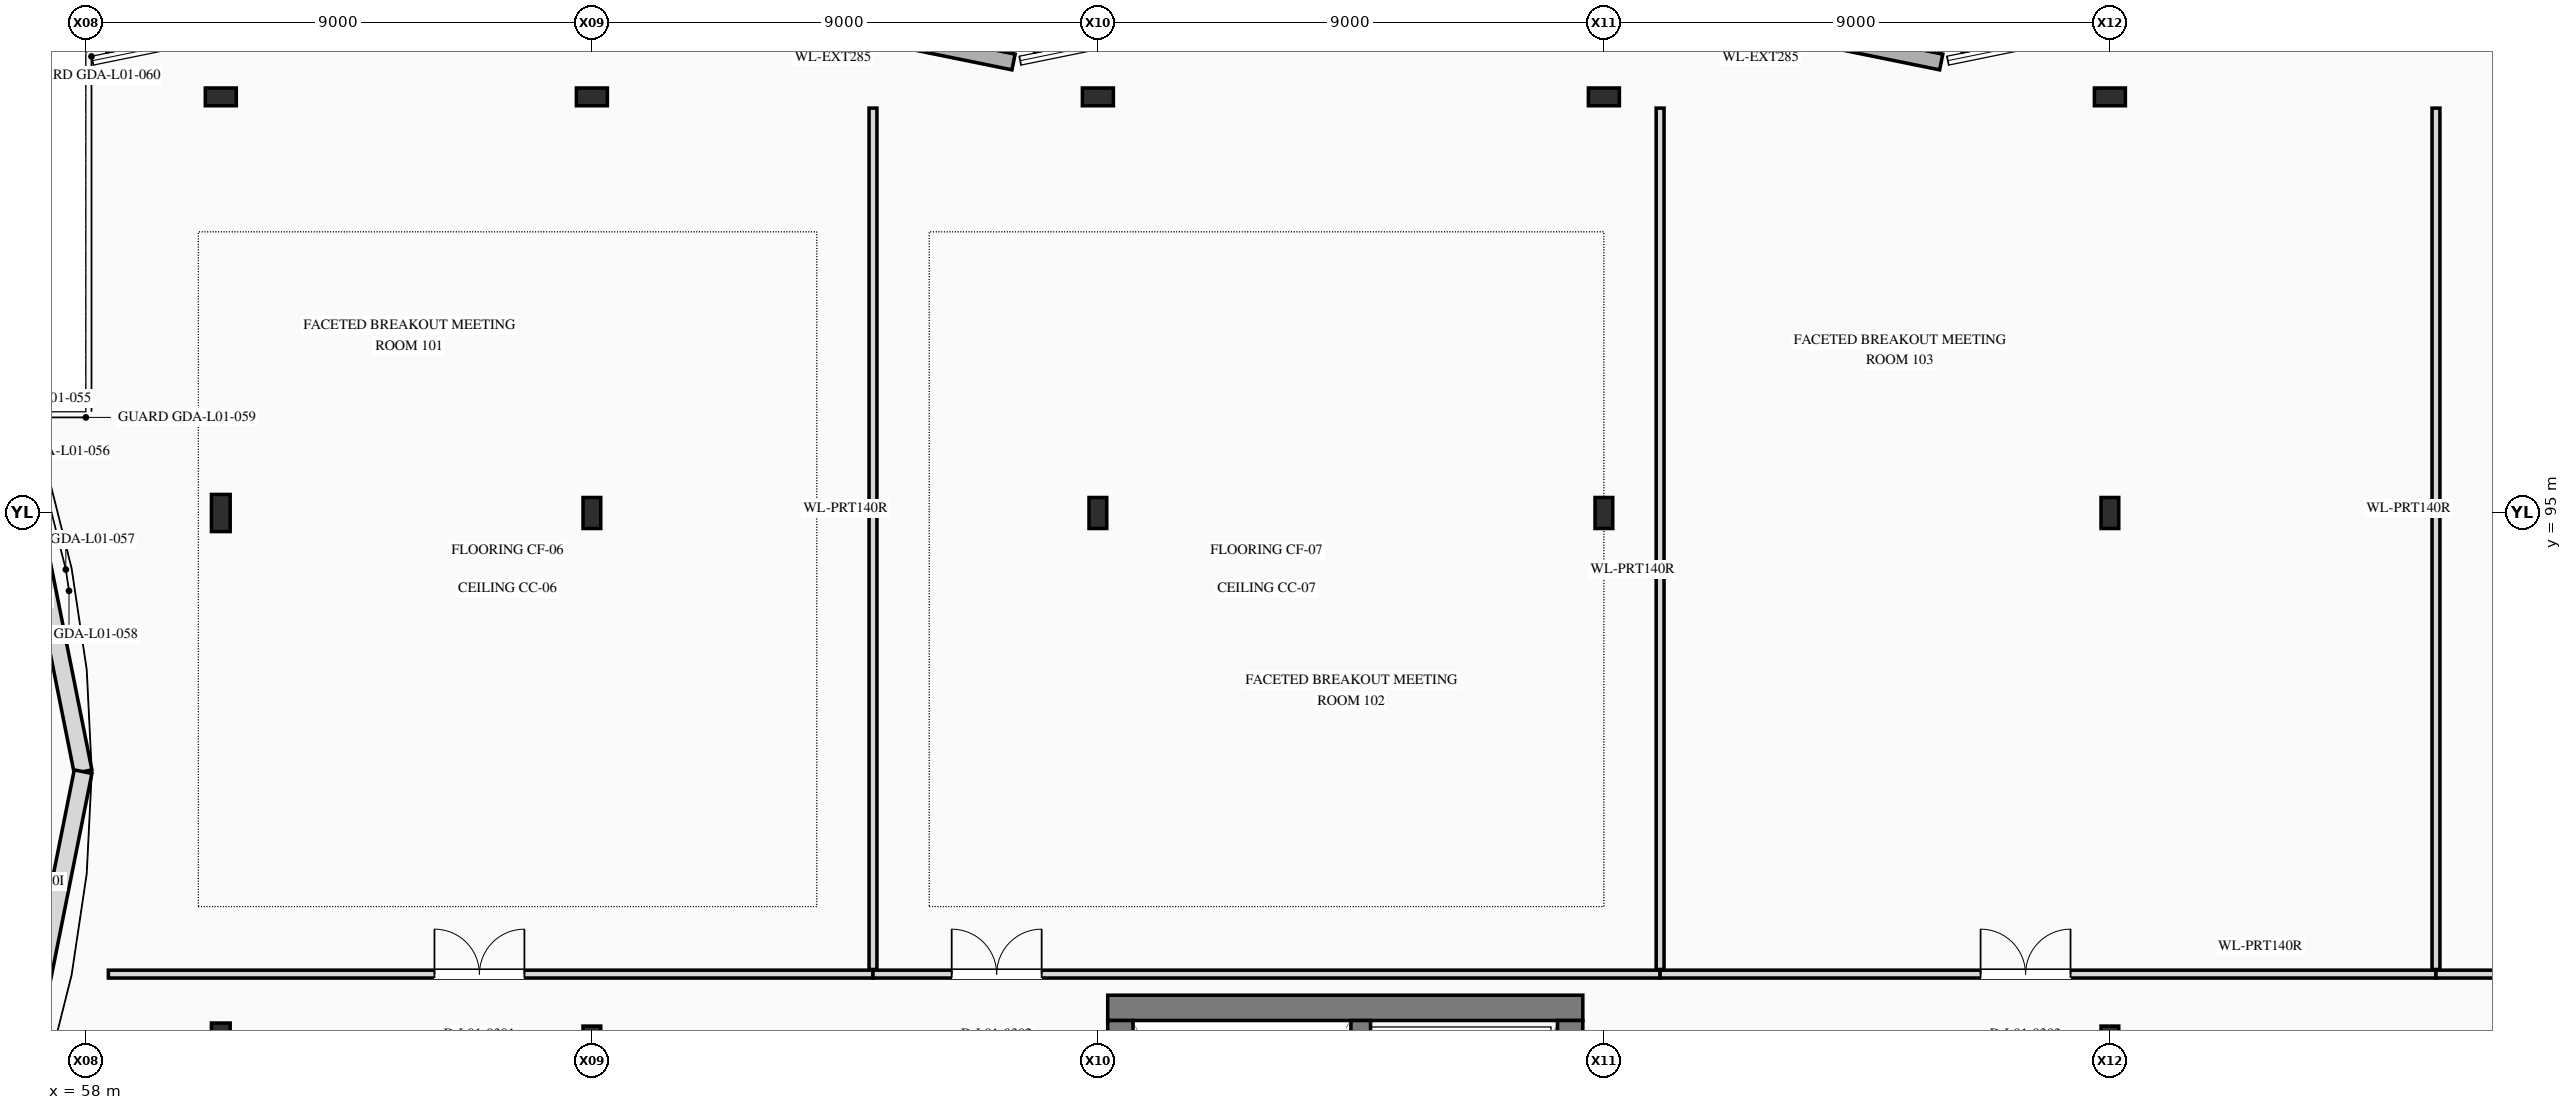
"""IFC4 building model, lengths in metres.
Left out: names, types, materials, properties, quantities, classifications, styles, units other than length and angle.
Written with IfcOpenShell. Run it as: python <this file> out.ifc"""

import sys

from ifc_helpers import new_model, si_unit, direction, frame, frame_2d, origin, origin_2d, place, context, subcontext, project, spatial, rectangle, i_section, extrude, element, fill, save


model = new_model("IFC4")
c1 = context("Model", 3, precision=1e-05, world=origin(), true_north=direction((0.0, 1.0)))
c2 = subcontext(c1, "Body", "Model", "MODEL_VIEW")
j1 = project(units=[si_unit("LENGTHUNIT", "METRE"), si_unit("PLANEANGLEUNIT", "RADIAN")], contexts=[c1])
p1 = place(None, origin())
s1 = spatial("IfcSite", under=j1, at=p1, CompositionType="ELEMENT")
p2 = place(p1, origin())
s2 = spatial("IfcBuilding", under=s1, at=p2, CompositionType="ELEMENT")
p3 = place(p2, frame((0.0, 0.0, 5.4)))
s3 = spatial("IfcBuildingStorey", under=s2, at=p3, CompositionType="ELEMENT", Elevation=5.4)
for number, where, z_axis, x_axis in (
    (1, (67.0, 85.6, 0.0), (0.0, 0.0, 1.0), (1.0, 0.0, 0.0)),
    (2, (67.0, 95.0, 0.0), (0.0, 0.0, 1.0), (1.0, 0.0, 0.0)),
    (3, (76.0, 95.0, 0.0), (0.0, 0.0, 1.0), (1.0, 0.0, 0.0)),
    (4, (85.0, 95.0, 0.0), (0.0, 0.0, 1.0), (1.0, 0.0, 0.0)),
    (5, (94.0, 85.6, 0.0), (0.0, 0.0, 1.0), (1.0, 0.0, 0.0)),
    (6, (94.0, 95.0, 0.0), (0.0, 0.0, 1.0), (1.0, 0.0, 0.0)),
):
    element("IfcColumn", number, at=place(p3, frame(where, z_axis=z_axis, x_axis=x_axis)), inside=s3, PredefinedType="COLUMN", context=c2, shape_type="SweptSolid", body=[
        extrude(i_section(OverallWidth=0.315, OverallDepth=0.551, WebThickness=0.015, FlangeThickness=0.024, at=origin_2d()), origin(), (0.0, 0.0, 1.0), 5.4),
    ])
for number, where, z_axis, x_axis in (
    (7, (60.4, 85.6, 0.0), (0.0, 0.0, 1.0), (1.0, 0.0, 0.0)),
    (8, (60.4, 95.0, 0.0), (0.0, 0.0, 1.0), (1.0, 0.0, 0.0)),
):
    element("IfcColumn", number, at=place(p3, frame(where, z_axis=z_axis, x_axis=x_axis)), inside=s3, PredefinedType="COLUMN", context=c2, shape_type="SweptSolid", body=[
        extrude(i_section(OverallWidth=0.333, OverallDepth=0.66, WebThickness=0.024, FlangeThickness=0.044, at=origin_2d()), origin(), (0.0, 0.0, 1.0), 5.4),
    ])
for number, where, z_axis, x_axis in (
    (9, (60.4, 102.4, 0.0), (0.0, 0.0, 1.0), (0.0, 1.0, 0.0)),
    (10, (67.0, 102.4, 0.0), (0.0, 0.0, 1.0), (0.0, 1.0, 0.0)),
    (11, (76.0, 102.4, 0.0), (0.0, 0.0, 1.0), (0.0, 1.0, 0.0)),
    (12, (85.0, 102.4, 0.0), (0.0, 0.0, 1.0), (0.0, 1.0, 0.0)),
    (13, (94.0, 102.4, 0.0), (0.0, 0.0, 1.0), (0.0, 1.0, 0.0)),
):
    element("IfcColumn", number, at=place(p3, frame(where, z_axis=z_axis, x_axis=x_axis)), inside=s3, PredefinedType="COLUMN", context=c2, shape_type="SweptSolid", body=[
        extrude(i_section(OverallWidth=0.315, OverallDepth=0.551, WebThickness=0.015, FlangeThickness=0.024, at=origin_2d()), origin(), (0.0, 0.0, 1.0), 5.4),
    ])
p4 = place(p3, frame((66.25, 104.698, 0.0), z_axis=(0.0, 0.0, 1.0), x_axis=(0.979925045119, -0.199366260807, 0.0)))
e14 = element("IfcWall", 14, at=p4, inside=s3, PredefinedType="STANDARD", context=c2, shape_type="SweptSolid", body=[
    extrude(rectangle(XDim=8.419, YDim=0.285, at=frame_2d((4.209, 0.0))), origin(), (0.0, 0.0, 1.0), 5.4),
])
p5 = place(p4, frame((0.35, 0.0, 0.9)))
e15 = element("IfcOpeningElement", 15, at=p5, cuts=e14, PredefinedType="OPENING", context=c2, shape_type="SweptSolid", body=[
    extrude(rectangle(XDim=1.5, YDim=1.7, at=frame_2d((0.75, 0.85))), frame((0.0, 0.152, 0.0), z_axis=(0.0, -1.0, 0.0), x_axis=(1.0, 0.0, 0.0)), (0.0, 0.0, 1.0), 0.305),
])
p6 = place(p3, frame((82.75, 104.698, 0.0), z_axis=(0.0, 0.0, 1.0), x_axis=(0.979925045119, -0.199366260807, 0.0)))
e16 = element("IfcWall", 16, at=p6, inside=s3, PredefinedType="STANDARD", context=c2, shape_type="SweptSolid", body=[
    extrude(rectangle(XDim=8.419, YDim=0.285, at=frame_2d((4.209, 0.0))), origin(), (0.0, 0.0, 1.0), 5.4),
])
p7 = place(p6, frame((0.35, 0.0, 0.9)))
e17 = element("IfcOpeningElement", 17, at=p7, cuts=e16, PredefinedType="OPENING", context=c2, shape_type="SweptSolid", body=[
    extrude(rectangle(XDim=1.5, YDim=1.7, at=frame_2d((0.75, 0.85))), frame((0.0, 0.152, 0.0), z_axis=(0.0, -1.0, 0.0), x_axis=(1.0, 0.0, 0.0)), (0.0, 0.0, 1.0), 0.305),
])
p8 = place(p3, frame((99.25, 104.698, 0.0), z_axis=(0.0, 0.0, 1.0), x_axis=(0.979925045119, -0.199366260807, 0.0)))
e18 = element("IfcWall", 18, at=p8, inside=s3, PredefinedType="STANDARD", context=c2, shape_type="SweptSolid", body=[
    extrude(rectangle(XDim=8.419, YDim=0.285, at=frame_2d((4.209, 0.0))), origin(), (0.0, 0.0, 1.0), 5.4),
])
p9 = place(p8, frame((0.35, 0.0, 0.9)))
e19 = element("IfcOpeningElement", 19, at=p9, cuts=e18, PredefinedType="OPENING", context=c2, shape_type="SweptSolid", body=[
    extrude(rectangle(XDim=1.5, YDim=1.7, at=frame_2d((0.75, 0.85))), frame((0.0, 0.152, 0.0), z_axis=(0.0, -1.0, 0.0), x_axis=(1.0, 0.0, 0.0)), (0.0, 0.0, 1.0), 0.305),
])
p10 = place(p3, frame((84.625, 86.2, 0.0), z_axis=(0.0, 0.0, 1.0), x_axis=(-1.0, 0.0, 0.0)))
e20 = element("IfcWall", 20, at=p10, inside=s3, PredefinedType="SHEAR", context=c2, shape_type="SweptSolid", body=[
    extrude(rectangle(XDim=8.45, YDim=0.45, at=frame_2d((4.225, 0.0))), origin(), (0.0, 0.0, 1.0), 5.4),
])
p11 = place(p3, frame((76.4, 85.975, 0.0), z_axis=(0.0, 0.0, 1.0), x_axis=(0.0, -1.0, 0.0)))
e21 = element("IfcWall", 21, at=p11, inside=s3, PredefinedType="SHEAR", context=c2, shape_type="SweptSolid", body=[
    extrude(rectangle(XDim=9.35, YDim=0.45, at=frame_2d((4.675, 0.0))), origin(), (0.0, 0.0, 1.0), 5.4),
])
p12 = place(p3, frame((84.4, 76.625, 0.0), z_axis=(0.0, 0.0, 1.0), x_axis=(0.0, 1.0, 0.0)))
e22 = element("IfcWall", 22, at=p12, inside=s3, PredefinedType="SHEAR", context=c2, shape_type="SweptSolid", body=[
    extrude(rectangle(XDim=9.35, YDim=0.45, at=frame_2d((4.675, 0.0))), origin(), (0.0, 0.0, 1.0), 5.4),
])
p13 = place(p12, frame((2.025, 0.0, 0.0)))
e23 = element("IfcOpeningElement", 23, at=p13, cuts=e22, PredefinedType="OPENING", context=c2, shape_type="SweptSolid", body=[
    extrude(rectangle(XDim=1.1, YDim=2.2, at=frame_2d((0.55, 1.1))), frame((0.0, 0.235, 0.0), z_axis=(0.0, -1.0, 0.0), x_axis=(1.0, 0.0, 0.0)), (0.0, 0.0, 1.0), 0.47),
])
p14 = place(p12, frame((5.625, 0.0, 0.0)))
e24 = element("IfcOpeningElement", 24, at=p14, cuts=e22, PredefinedType="OPENING", context=c2, shape_type="SweptSolid", body=[
    extrude(rectangle(XDim=1.1, YDim=2.2, at=frame_2d((0.55, 1.1))), frame((0.0, 0.235, 0.0), z_axis=(0.0, -1.0, 0.0), x_axis=(1.0, 0.0, 0.0)), (0.0, 0.0, 1.0), 0.47),
])
p15 = place(p3, frame((80.675, 76.625, 0.0), z_axis=(0.0, 0.0, 1.0), x_axis=(0.0, 1.0, 0.0)))
e25 = element("IfcWall", 25, at=p15, inside=s3, PredefinedType="SHEAR", context=c2, shape_type="SweptSolid", body=[
    extrude(rectangle(XDim=9.35, YDim=0.35, at=frame_2d((4.675, 0.0))), origin(), (0.0, 0.0, 1.0), 5.4),
])
p16 = place(p3, frame((57.95, 90.4, 0.0), z_axis=(0.0, 0.0, 1.0), x_axis=(-0.195895407339, 0.980624795415, 0.0)))
e26 = element("IfcWall", 26, at=p16, inside=s3, PredefinedType="PARTITIONING", context=c2, shape_type="SweptSolid", body=[
    extrude(rectangle(XDim=7.232, YDim=0.32, at=frame_2d((3.616, 0.0))), origin(), (0.0, 0.0, 1.0), 5.095),
])
p17 = place(p3, frame((56.533, 83.308, 0.0), z_axis=(0.0, 0.0, 1.0), x_axis=(0.195901892383, 0.980623499902, 0.0)))
e27 = element("IfcWall", 27, at=p17, inside=s3, PredefinedType="PARTITIONING", context=c2, shape_type="SweptSolid", body=[
    extrude(rectangle(XDim=7.232, YDim=0.32, at=frame_2d((3.616, 0.0))), origin(), (0.0, 0.0, 1.0), 5.095),
])
p18 = place(p17, frame((0.25, 0.0, 0.0)))
e28 = element("IfcOpeningElement", 28, at=p18, cuts=e27, PredefinedType="OPENING", context=c2, shape_type="SweptSolid", body=[
    extrude(rectangle(XDim=1.8, YDim=2.45, at=frame_2d((0.9, 1.225))), frame((0.0, 0.17, 0.0), z_axis=(0.0, -1.0, 0.0), x_axis=(1.0, 0.0, 0.0)), (0.0, 0.0, 1.0), 0.34),
])
p19 = place(p3, frame((58.4, 86.8, 0.0), z_axis=(0.0, 0.0, 1.0), x_axis=(1.0, 0.0, 0.0)))
e29 = element("IfcWall", 29, at=p19, inside=s3, PredefinedType="PARTITIONING", context=c2, shape_type="SweptSolid", body=[
    extrude(rectangle(XDim=13.6, YDim=0.14, at=frame_2d((6.8, 0.0))), origin(), (0.0, 0.0, 1.0), 4.569),
])
p20 = place(p19, frame((5.8, 0.0, 0.0)))
e30 = element("IfcOpeningElement", 30, at=p20, cuts=e29, PredefinedType="OPENING", context=c2, shape_type="SweptSolid", body=[
    extrude(rectangle(XDim=1.6, YDim=2.4, at=frame_2d((0.8, 1.2))), frame((0.0, 0.08, 0.0), z_axis=(0.0, -1.0, 0.0), x_axis=(1.0, 0.0, 0.0)), (0.0, 0.0, 1.0), 0.16),
])
p21 = place(p3, frame((72.0, 86.8, 0.0), z_axis=(0.0, 0.0, 1.0), x_axis=(1.0, 0.0, 0.0)))
e31 = element("IfcWall", 31, at=p21, inside=s3, PredefinedType="PARTITIONING", context=c2, shape_type="SweptSolid", body=[
    extrude(rectangle(XDim=14.0, YDim=0.14, at=frame_2d((7.0, 0.0))), origin(), (0.0, 0.0, 1.0), 5.095),
])
p22 = place(p21, frame((1.4, 0.0, 0.0)))
e32 = element("IfcOpeningElement", 32, at=p22, cuts=e31, PredefinedType="OPENING", context=c2, shape_type="SweptSolid", body=[
    extrude(rectangle(XDim=1.6, YDim=2.4, at=frame_2d((0.8, 1.2))), frame((0.0, 0.08, 0.0), z_axis=(0.0, -1.0, 0.0), x_axis=(1.0, 0.0, 0.0)), (0.0, 0.0, 1.0), 0.16),
])
p23 = place(p3, frame((86.0, 86.8, 0.0), z_axis=(0.0, 0.0, 1.0), x_axis=(1.0, 0.0, 0.0)))
e33 = element("IfcWall", 33, at=p23, inside=s3, PredefinedType="PARTITIONING", context=c2, shape_type="SweptSolid", body=[
    extrude(rectangle(XDim=13.8, YDim=0.14, at=frame_2d((6.9, 0.0))), origin(), (0.0, 0.0, 1.0), 4.569),
])
p24 = place(p23, frame((5.7, 0.0, 0.0)))
e34 = element("IfcOpeningElement", 34, at=p24, cuts=e33, PredefinedType="OPENING", context=c2, shape_type="SweptSolid", body=[
    extrude(rectangle(XDim=1.6, YDim=2.4, at=frame_2d((0.8, 1.2))), frame((0.0, 0.08, 0.0), z_axis=(0.0, -1.0, 0.0), x_axis=(1.0, 0.0, 0.0)), (0.0, 0.0, 1.0), 0.16),
])
p25 = place(p3, frame((99.8, 86.8, 0.0), z_axis=(0.0, 0.0, 1.0), x_axis=(1.0, 0.0, 0.0)))
e35 = element("IfcWall", 35, at=p25, inside=s3, PredefinedType="PARTITIONING", context=c2, shape_type="SweptSolid", body=[
    extrude(rectangle(XDim=12.2, YDim=0.14, at=frame_2d((6.1, 0.0))), origin(), (0.0, 0.0, 1.0), 4.569),
])
p26 = place(p25, frame((4.9, 0.0, 0.0)))
e36 = element("IfcOpeningElement", 36, at=p26, cuts=e35, PredefinedType="OPENING", context=c2, shape_type="SweptSolid", body=[
    extrude(rectangle(XDim=1.6, YDim=2.4, at=frame_2d((0.8, 1.2))), frame((0.0, 0.08, 0.0), z_axis=(0.0, -1.0, 0.0), x_axis=(1.0, 0.0, 0.0)), (0.0, 0.0, 1.0), 0.16),
])
for number, where, z_axis, x_axis in (
    (37, (72.0, 86.882, 0.0), (0.0, 0.0, 1.0), (0.0, 1.0, 0.0)),
    (38, (86.0, 86.882, 0.0), (0.0, 0.0, 1.0), (0.0, 1.0, 0.0)),
    (39, (99.8, 86.882, 0.0), (0.0, 0.0, 1.0), (0.0, 1.0, 0.0)),
):
    element("IfcWall", number, at=place(p3, frame(where, z_axis=z_axis, x_axis=x_axis)), inside=s3, PredefinedType="PARTITIONING", context=c2, shape_type="SweptSolid", body=[
        extrude(rectangle(XDim=15.318, YDim=0.14, at=frame_2d((7.659, 0.0))), origin(), (0.0, 0.0, 1.0), 4.508),
    ])
p27 = place(p20, origin())
e40 = element("IfcDoor", 40, at=p27, inside=s3, OperationType="DOUBLE_DOOR_SINGLE_SWING", PredefinedType="DOOR", context=c2, shape_type="SweptSolid", body=[
    extrude(rectangle(XDim=1.6, YDim=2.4, at=frame_2d((0.8, 1.2))), frame((0.0, 0.025, 0.0), z_axis=(0.0, -1.0, 0.0), x_axis=(1.0, 0.0, 0.0)), (0.0, 0.0, 1.0), 0.05),
])
fill(e30, e40)
p28 = place(p22, origin())
e41 = element("IfcDoor", 41, at=p28, inside=s3, OperationType="DOUBLE_DOOR_SINGLE_SWING", PredefinedType="DOOR", context=c2, shape_type="SweptSolid", body=[
    extrude(rectangle(XDim=1.6, YDim=2.4, at=frame_2d((0.8, 1.2))), frame((0.0, 0.025, 0.0), z_axis=(0.0, -1.0, 0.0), x_axis=(1.0, 0.0, 0.0)), (0.0, 0.0, 1.0), 0.05),
])
fill(e32, e41)
p29 = place(p24, origin())
e42 = element("IfcDoor", 42, at=p29, inside=s3, OperationType="DOUBLE_DOOR_SINGLE_SWING", PredefinedType="DOOR", context=c2, shape_type="SweptSolid", body=[
    extrude(rectangle(XDim=1.6, YDim=2.4, at=frame_2d((0.8, 1.2))), frame((0.0, 0.025, 0.0), z_axis=(0.0, -1.0, 0.0), x_axis=(1.0, 0.0, 0.0)), (0.0, 0.0, 1.0), 0.05),
])
fill(e34, e42)
save(model, sys.argv[1])
